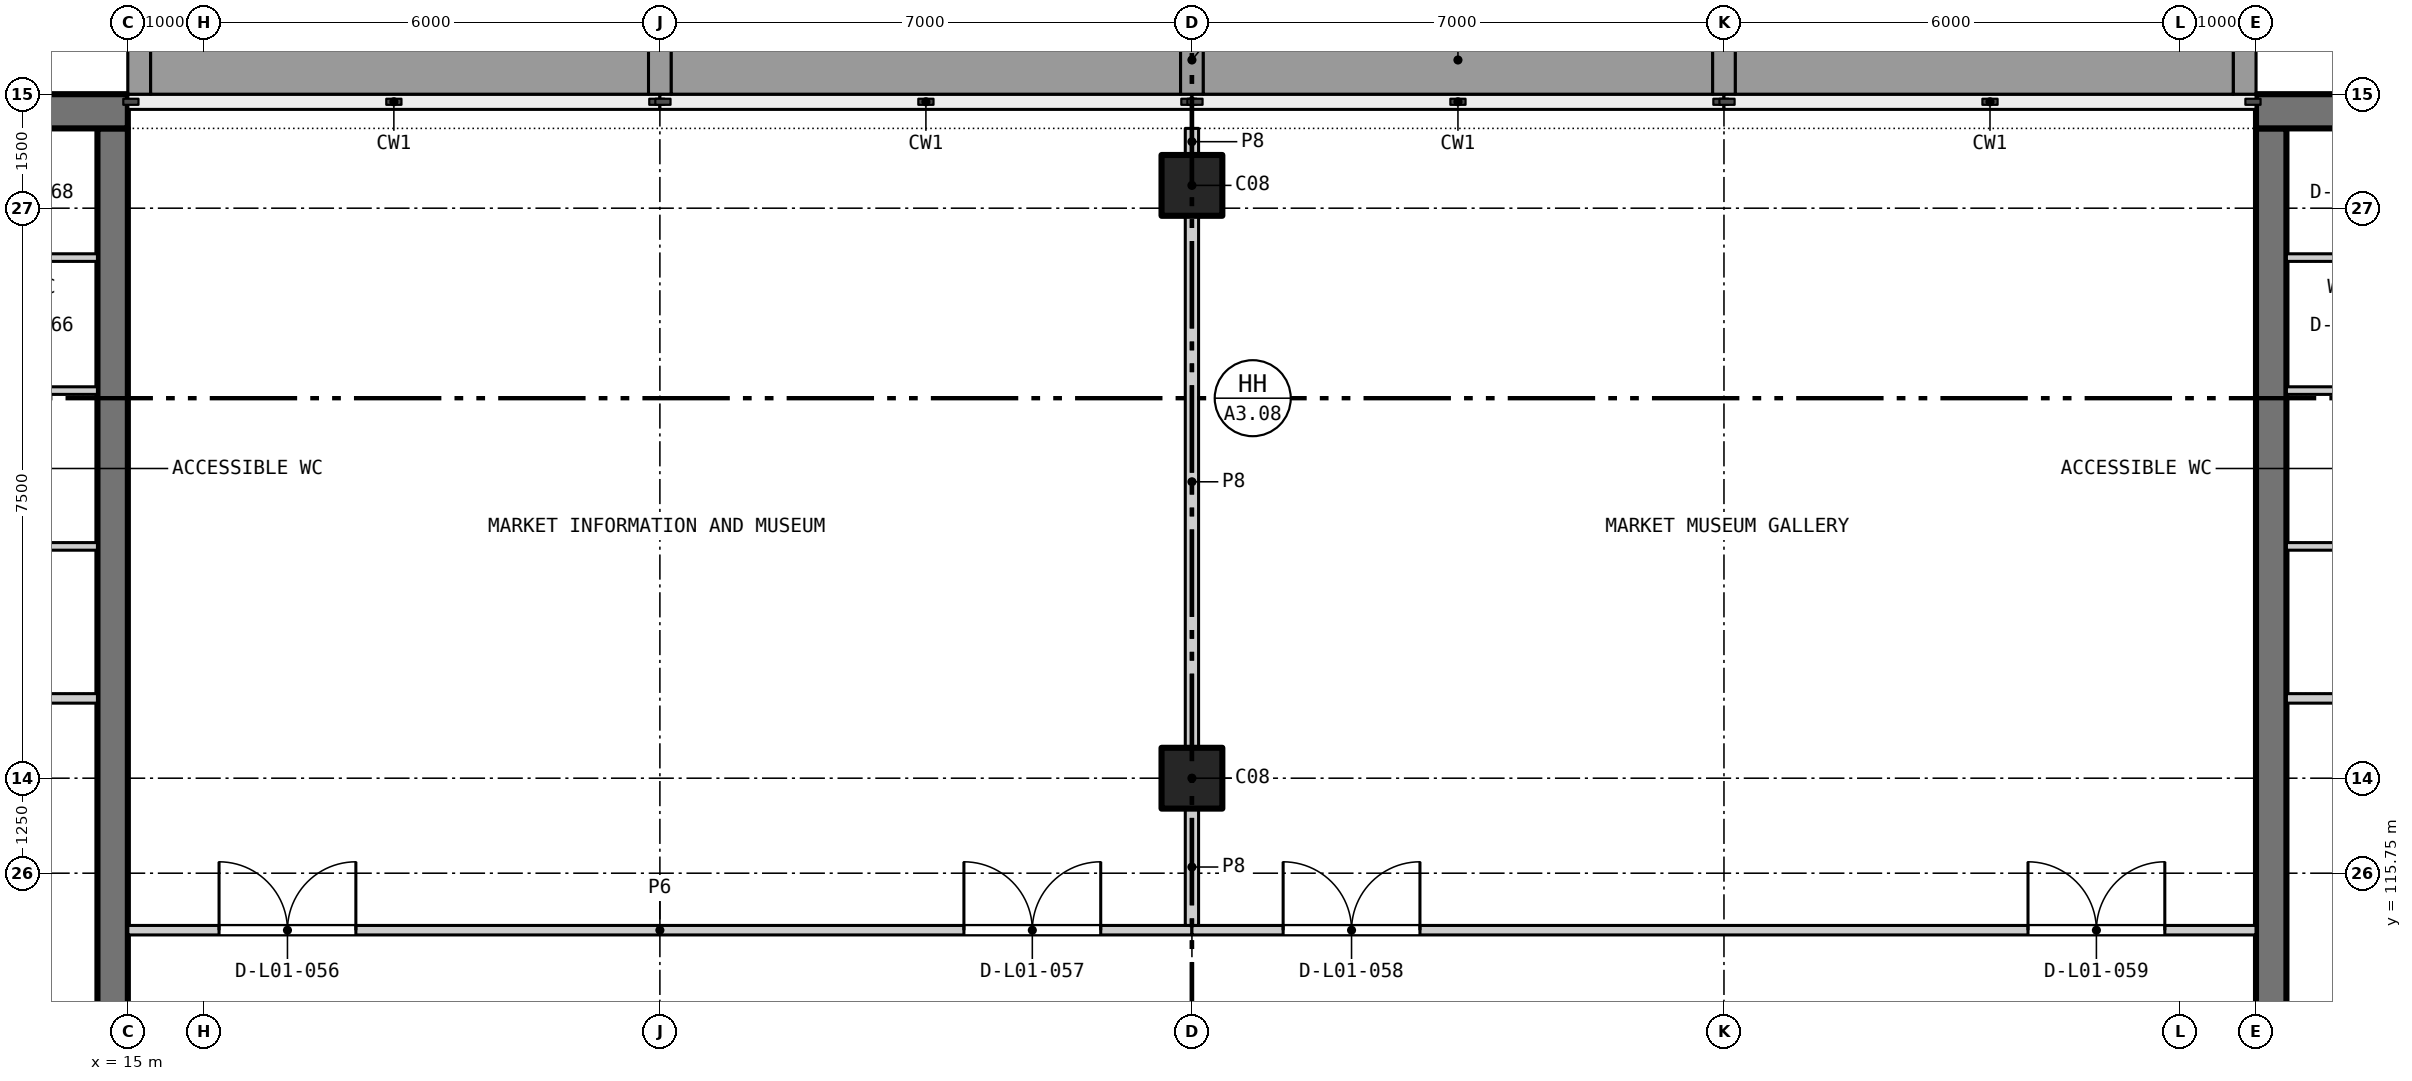
"""IFC4 building model, lengths in metres.
Left out: names, types, materials, properties, quantities, classifications, styles, units other than length and angle.
Written with IfcOpenShell. Run it as: python <this file> out.ifc"""

import sys

from ifc_helpers import new_model, si_unit, direction, frame, frame_2d, origin, origin_2d, place, context, subcontext, project, spatial, rectangle, extrude, element, fill, save


model = new_model("IFC4")
c1 = context("Model", 3, precision=1e-05, world=origin(), true_north=direction((0.0, 1.0)))
c2 = subcontext(c1, "Body", "Model", "MODEL_VIEW")
j1 = project(units=[si_unit("LENGTHUNIT", "METRE"), si_unit("PLANEANGLEUNIT", "RADIAN")], contexts=[c1])
p1 = place(None, origin())
s1 = spatial("IfcSite", under=j1, at=p1, CompositionType="ELEMENT")
p2 = place(p1, origin())
s2 = spatial("IfcBuilding", under=s1, at=p2, CompositionType="ELEMENT")
p3 = place(p2, frame((0.0, 0.0, 6.0)))
s3 = spatial("IfcBuildingStorey", under=s2, at=p3, CompositionType="ELEMENT", Elevation=6.0)
for number, where, z_axis, x_axis in (
    (1, (29.0, 117.0, 0.0), (0.0, 0.0, 1.0), (1.0, 0.0, 0.0)),
    (2, (29.0, 124.8, 0.0), (0.0, 0.0, 1.0), (1.0, 0.0, 0.0)),
):
    element("IfcColumn", number, at=place(p3, frame(where, z_axis=z_axis, x_axis=x_axis)), inside=s3, PredefinedType="COLUMN", context=c2, shape_type="SweptSolid", body=[
        extrude(rectangle(XDim=0.8, YDim=0.8, at=origin_2d()), origin(), (0.0, 0.0, 1.0), 3.9),
    ])
p4 = place(p3, frame((14.8, 99.0, 0.0), z_axis=(0.0, 0.0, 1.0), x_axis=(0.0, 1.0, 0.0)))
e3 = element("IfcWall", 3, at=p4, inside=s3, PredefinedType="SHEAR", context=c2, shape_type="SweptSolid", body=[
    extrude(rectangle(XDim=26.55, YDim=0.4, at=frame_2d((13.275, 0.0))), origin(), (0.0, 0.0, 1.0), 4.2),
])
p5 = place(p4, frame((13.55, 0.0, 0.0)))
e4 = element("IfcOpeningElement", 4, at=p5, cuts=e3, PredefinedType="OPENING", context=c2, shape_type="SweptSolid", body=[
    extrude(rectangle(XDim=1.4, YDim=2.4, at=frame_2d((0.7, 1.2))), frame((0.0, 0.21, 0.0), z_axis=(0.0, -1.0, 0.0), x_axis=(1.0, 0.0, 0.0)), (0.0, 0.0, 1.0), 0.42),
])
p6 = place(p3, frame((43.2, 99.0, 0.0), z_axis=(0.0, 0.0, 1.0), x_axis=(0.0, 1.0, 0.0)))
e5 = element("IfcWall", 5, at=p6, inside=s3, PredefinedType="SHEAR", context=c2, shape_type="SweptSolid", body=[
    extrude(rectangle(XDim=26.55, YDim=0.4, at=frame_2d((13.275, 0.0))), origin(), (0.0, 0.0, 1.0), 4.2),
])
p7 = place(p6, frame((13.55, 0.0, 0.0)))
e6 = element("IfcOpeningElement", 6, at=p7, cuts=e5, PredefinedType="OPENING", context=c2, shape_type="SweptSolid", body=[
    extrude(rectangle(XDim=1.4, YDim=2.4, at=frame_2d((0.7, 1.2))), frame((0.0, 0.21, 0.0), z_axis=(0.0, -1.0, 0.0), x_axis=(1.0, 0.0, 0.0)), (0.0, 0.0, 1.0), 0.42),
])
p8 = place(p3, frame((0.3, 125.775, 0.0), z_axis=(0.0, 0.0, 1.0), x_axis=(1.0, 0.0, 0.0)))
e7 = element("IfcWall", 7, at=p8, inside=s3, PredefinedType="SOLIDWALL", context=c2, shape_type="SweptSolid", body=[
    extrude(rectangle(XDim=14.7, YDim=0.45, at=frame_2d((7.35, 0.0))), origin(), (0.0, 0.0, 1.0), 3.9),
])
p9 = place(p8, frame((4.85, 0.0, 0.8)))
e8 = element("IfcOpeningElement", 8, at=p9, cuts=e7, PredefinedType="OPENING", context=c2, shape_type="SweptSolid", body=[
    extrude(rectangle(XDim=1.5, YDim=2.2, at=frame_2d((0.75, 1.1))), frame((0.0, 0.235, 0.0), z_axis=(0.0, -1.0, 0.0), x_axis=(1.0, 0.0, 0.0)), (0.0, 0.0, 1.0), 0.47),
])
p10 = place(p8, frame((7.95, 0.0, 0.8)))
e9 = element("IfcOpeningElement", 9, at=p10, cuts=e7, PredefinedType="OPENING", context=c2, shape_type="SweptSolid", body=[
    extrude(rectangle(XDim=1.5, YDim=2.2, at=frame_2d((0.75, 1.1))), frame((0.0, 0.235, 0.0), z_axis=(0.0, -1.0, 0.0), x_axis=(1.0, 0.0, 0.0)), (0.0, 0.0, 1.0), 0.47),
])
p11 = place(p8, frame((11.45, 0.0, 0.8)))
e10 = element("IfcOpeningElement", 10, at=p11, cuts=e7, PredefinedType="OPENING", context=c2, shape_type="SweptSolid", body=[
    extrude(rectangle(XDim=1.5, YDim=2.2, at=frame_2d((0.75, 1.1))), frame((0.0, 0.235, 0.0), z_axis=(0.0, -1.0, 0.0), x_axis=(1.0, 0.0, 0.0)), (0.0, 0.0, 1.0), 0.47),
])
p12 = place(p3, frame((43.0, 125.775, 0.0), z_axis=(0.0, 0.0, 1.0), x_axis=(1.0, 0.0, 0.0)))
e11 = element("IfcWall", 11, at=p12, inside=s3, PredefinedType="SOLIDWALL", context=c2, shape_type="SweptSolid", body=[
    extrude(rectangle(XDim=14.55, YDim=0.45, at=frame_2d((7.275, 0.0))), origin(), (0.0, 0.0, 1.0), 3.9),
])
p13 = place(p12, frame((8.35, 0.0, 0.8)))
e12 = element("IfcOpeningElement", 12, at=p13, cuts=e11, PredefinedType="OPENING", context=c2, shape_type="SweptSolid", body=[
    extrude(rectangle(XDim=1.5, YDim=2.2, at=frame_2d((0.75, 1.1))), frame((0.0, 0.235, 0.0), z_axis=(0.0, -1.0, 0.0), x_axis=(1.0, 0.0, 0.0)), (0.0, 0.0, 1.0), 0.47),
])
p14 = place(p12, frame((5.25, 0.0, 0.8)))
e13 = element("IfcOpeningElement", 13, at=p14, cuts=e11, PredefinedType="OPENING", context=c2, shape_type="SweptSolid", body=[
    extrude(rectangle(XDim=1.5, YDim=2.2, at=frame_2d((0.75, 1.1))), frame((0.0, 0.235, 0.0), z_axis=(0.0, -1.0, 0.0), x_axis=(1.0, 0.0, 0.0)), (0.0, 0.0, 1.0), 0.47),
])
p15 = place(p12, frame((1.75, 0.0, 0.8)))
e14 = element("IfcOpeningElement", 14, at=p15, cuts=e11, PredefinedType="OPENING", context=c2, shape_type="SweptSolid", body=[
    extrude(rectangle(XDim=1.5, YDim=2.2, at=frame_2d((0.75, 1.1))), frame((0.0, 0.235, 0.0), z_axis=(0.0, -1.0, 0.0), x_axis=(1.0, 0.0, 0.0)), (0.0, 0.0, 1.0), 0.47),
])
p16 = place(p3, frame((15.0, 115.0, 0.0), z_axis=(0.0, 0.0, 1.0), x_axis=(1.0, 0.0, 0.0)))
e15 = element("IfcWall", 15, at=p16, inside=s3, PredefinedType="PARTITIONING", context=c2, shape_type="SweptSolid", body=[
    extrude(rectangle(XDim=14.0, YDim=0.125, at=frame_2d((7.0, 0.0))), origin(), (0.0, 0.0, 1.0), 3.9),
])
p17 = place(p16, frame((1.2, 0.0, 0.0)))
e16 = element("IfcOpeningElement", 16, at=p17, cuts=e15, PredefinedType="OPENING", context=c2, shape_type="SweptSolid", body=[
    extrude(rectangle(XDim=1.8, YDim=2.1, at=frame_2d((0.9, 1.05))), frame((0.0, 0.073, 0.0), z_axis=(0.0, -1.0, 0.0), x_axis=(1.0, 0.0, 0.0)), (0.0, 0.0, 1.0), 0.145),
])
p18 = place(p16, frame((11.0, 0.0, 0.0)))
e17 = element("IfcOpeningElement", 17, at=p18, cuts=e15, PredefinedType="OPENING", context=c2, shape_type="SweptSolid", body=[
    extrude(rectangle(XDim=1.8, YDim=2.1, at=frame_2d((0.9, 1.05))), frame((0.0, 0.073, 0.0), z_axis=(0.0, -1.0, 0.0), x_axis=(1.0, 0.0, 0.0)), (0.0, 0.0, 1.0), 0.145),
])
p19 = place(p3, frame((29.0, 115.0, 0.0), z_axis=(0.0, 0.0, 1.0), x_axis=(1.0, 0.0, 0.0)))
e18 = element("IfcWall", 18, at=p19, inside=s3, PredefinedType="PARTITIONING", context=c2, shape_type="SweptSolid", body=[
    extrude(rectangle(XDim=14.0, YDim=0.125, at=frame_2d((7.0, 0.0))), origin(), (0.0, 0.0, 1.0), 3.9),
])
p20 = place(p19, frame((1.2, 0.0, 0.0)))
e19 = element("IfcOpeningElement", 19, at=p20, cuts=e18, PredefinedType="OPENING", context=c2, shape_type="SweptSolid", body=[
    extrude(rectangle(XDim=1.8, YDim=2.1, at=frame_2d((0.9, 1.05))), frame((0.0, 0.073, 0.0), z_axis=(0.0, -1.0, 0.0), x_axis=(1.0, 0.0, 0.0)), (0.0, 0.0, 1.0), 0.145),
])
p21 = place(p19, frame((11.0, 0.0, 0.0)))
e20 = element("IfcOpeningElement", 20, at=p21, cuts=e18, PredefinedType="OPENING", context=c2, shape_type="SweptSolid", body=[
    extrude(rectangle(XDim=1.8, YDim=2.1, at=frame_2d((0.9, 1.05))), frame((0.0, 0.073, 0.0), z_axis=(0.0, -1.0, 0.0), x_axis=(1.0, 0.0, 0.0)), (0.0, 0.0, 1.0), 0.145),
])
p22 = place(p3, frame((10.1, 118.05, 0.0), z_axis=(0.0, 0.0, 1.0), x_axis=(1.0, 0.0, 0.0)))
e21 = element("IfcWall", 21, at=p22, inside=s3, PredefinedType="PARTITIONING", context=c2, shape_type="SweptSolid", body=[
    extrude(rectangle(XDim=4.5, YDim=0.125, at=frame_2d((2.25, 0.0))), origin(), (0.0, 0.0, 1.0), 3.9),
])
p23 = place(p22, frame((1.75, 0.0, 0.0)))
e22 = element("IfcOpeningElement", 22, at=p23, cuts=e21, PredefinedType="OPENING", context=c2, shape_type="SweptSolid", body=[
    extrude(rectangle(XDim=1.0, YDim=2.1, at=frame_2d((0.5, 1.05))), frame((0.0, 0.073, 0.0), z_axis=(0.0, -1.0, 0.0), x_axis=(1.0, 0.0, 0.0)), (0.0, 0.0, 1.0), 0.145),
])
p24 = place(p3, frame((43.4, 118.05, 0.0), z_axis=(0.0, 0.0, 1.0), x_axis=(1.0, 0.0, 0.0)))
e23 = element("IfcWall", 23, at=p24, inside=s3, PredefinedType="PARTITIONING", context=c2, shape_type="SweptSolid", body=[
    extrude(rectangle(XDim=4.5, YDim=0.125, at=frame_2d((2.25, 0.0))), origin(), (0.0, 0.0, 1.0), 3.9),
])
p25 = place(p24, frame((1.75, 0.0, 0.0)))
e24 = element("IfcOpeningElement", 24, at=p25, cuts=e23, PredefinedType="OPENING", context=c2, shape_type="SweptSolid", body=[
    extrude(rectangle(XDim=1.0, YDim=2.1, at=frame_2d((0.5, 1.05))), frame((0.0, 0.073, 0.0), z_axis=(0.0, -1.0, 0.0), x_axis=(1.0, 0.0, 0.0)), (0.0, 0.0, 1.0), 0.145),
])
for number, where, z_axis, x_axis in (
    (25, (11.65, 120.05, 0.0), (0.0, 0.0, 1.0), (1.0, 0.0, 0.0)),
    (26, (43.4, 120.05, 0.0), (0.0, 0.0, 1.0), (1.0, 0.0, 0.0)),
):
    element("IfcWall", number, at=place(p3, frame(where, z_axis=z_axis, x_axis=x_axis)), inside=s3, PredefinedType="PARTITIONING", context=c2, shape_type="SweptSolid", body=[
        extrude(rectangle(XDim=2.95, YDim=0.1, at=frame_2d((1.475, 0.0))), origin(), (0.0, 0.0, 1.0), 3.9),
    ])
for number, where, z_axis, x_axis in (
    (27, (11.75, 122.1, 0.0), (0.0, 0.0, 1.0), (1.0, 0.0, 0.0)),
    (28, (43.4, 122.1, 0.0), (0.0, 0.0, 1.0), (1.0, 0.0, 0.0)),
    (29, (11.75, 123.85, 0.0), (0.0, 0.0, 1.0), (1.0, 0.0, 0.0)),
    (30, (43.4, 123.85, 0.0), (0.0, 0.0, 1.0), (1.0, 0.0, 0.0)),
):
    element("IfcWall", number, at=place(p3, frame(where, z_axis=z_axis, x_axis=x_axis)), inside=s3, PredefinedType="PARTITIONING", context=c2, shape_type="SweptSolid", body=[
        extrude(rectangle(XDim=2.85, YDim=0.1, at=frame_2d((1.425, 0.0))), origin(), (0.0, 0.0, 1.0), 3.9),
    ])
p26 = place(p3, frame((29.0, 115.062, 0.0), z_axis=(0.0, 0.0, 1.0), x_axis=(0.0, 1.0, 0.0)))
e31 = element("IfcWall", 31, at=p26, inside=s3, PredefinedType="PARTITIONING", context=c2, shape_type="SweptSolid", body=[
    extrude(rectangle(XDim=1.538, YDim=0.175, at=frame_2d((0.769, 0.0))), origin(), (0.0, 0.0, 1.0), 2.9),
])
p27 = place(p3, frame((29.0, 117.4, 0.0), z_axis=(0.0, 0.0, 1.0), x_axis=(0.0, 1.0, 0.0)))
e32 = element("IfcWall", 32, at=p27, inside=s3, PredefinedType="PARTITIONING", context=c2, shape_type="SweptSolid", body=[
    extrude(rectangle(XDim=7.0, YDim=0.175, at=frame_2d((3.5, 0.0))), origin(), (0.0, 0.0, 1.0), 2.9),
])
p28 = place(p3, frame((29.0, 125.2, 0.0), z_axis=(0.0, 0.0, 1.0), x_axis=(0.0, 1.0, 0.0)))
e33 = element("IfcWall", 33, at=p28, inside=s3, PredefinedType="PARTITIONING", context=c2, shape_type="SweptSolid", body=[
    extrude(rectangle(XDim=0.35, YDim=0.175, at=frame_2d((0.175, 0.0))), origin(), (0.0, 0.0, 1.0), 3.9),
])
p29 = place(p17, origin())
e34 = element("IfcDoor", 34, at=p29, inside=s3, OperationType="DOUBLE_DOOR_SINGLE_SWING", PredefinedType="DOOR", context=c2, shape_type="SweptSolid", body=[
    extrude(rectangle(XDim=1.8, YDim=2.1, at=frame_2d((0.9, 1.05))), frame((0.0, 0.025, 0.0), z_axis=(0.0, -1.0, 0.0), x_axis=(1.0, 0.0, 0.0)), (0.0, 0.0, 1.0), 0.05),
])
fill(e16, e34)
p30 = place(p18, origin())
e35 = element("IfcDoor", 35, at=p30, inside=s3, OperationType="DOUBLE_DOOR_SINGLE_SWING", PredefinedType="DOOR", context=c2, shape_type="SweptSolid", body=[
    extrude(rectangle(XDim=1.8, YDim=2.1, at=frame_2d((0.9, 1.05))), frame((0.0, 0.025, 0.0), z_axis=(0.0, -1.0, 0.0), x_axis=(1.0, 0.0, 0.0)), (0.0, 0.0, 1.0), 0.05),
])
fill(e17, e35)
p31 = place(p20, origin())
e36 = element("IfcDoor", 36, at=p31, inside=s3, OperationType="DOUBLE_DOOR_SINGLE_SWING", PredefinedType="DOOR", context=c2, shape_type="SweptSolid", body=[
    extrude(rectangle(XDim=1.8, YDim=2.1, at=frame_2d((0.9, 1.05))), frame((0.0, 0.025, 0.0), z_axis=(0.0, -1.0, 0.0), x_axis=(1.0, 0.0, 0.0)), (0.0, 0.0, 1.0), 0.05),
])
fill(e19, e36)
p32 = place(p21, origin())
e37 = element("IfcDoor", 37, at=p32, inside=s3, OperationType="DOUBLE_DOOR_SINGLE_SWING", PredefinedType="DOOR", context=c2, shape_type="SweptSolid", body=[
    extrude(rectangle(XDim=1.8, YDim=2.1, at=frame_2d((0.9, 1.05))), frame((0.0, 0.025, 0.0), z_axis=(0.0, -1.0, 0.0), x_axis=(1.0, 0.0, 0.0)), (0.0, 0.0, 1.0), 0.05),
])
fill(e20, e37)
save(model, sys.argv[1])
